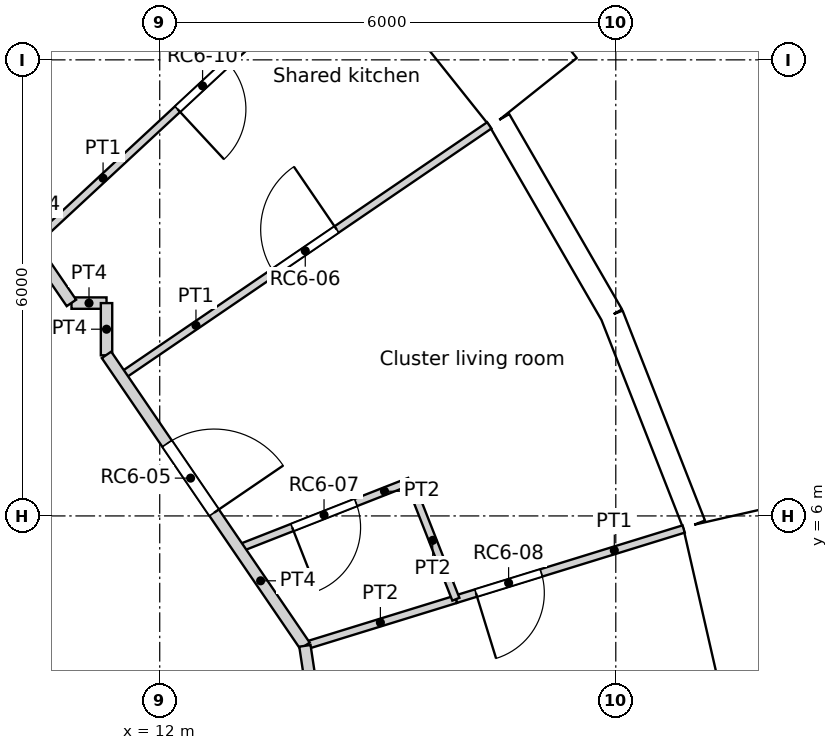
"""IFC4 building model, lengths in metres.
Left out: names, types, materials, properties, quantities, classifications, styles, units other than length and angle.
Written with IfcOpenShell. Run it as: python <this file> out.ifc"""

import sys

from ifc_helpers import new_model, si_unit, direction, frame, frame_2d, origin, origin_2d, place, context, subcontext, project, spatial, rectangle, circle, extrude, element, fill, save


model = new_model("IFC4")
c1 = context("Model", 3, precision=1e-05, world=origin(), true_north=direction((0.0, 1.0)))
c2 = subcontext(c1, "Body", "Model", "MODEL_VIEW")
j1 = project(units=[si_unit("LENGTHUNIT", "METRE"), si_unit("PLANEANGLEUNIT", "RADIAN")], contexts=[c1])
p1 = place(None, origin())
s1 = spatial("IfcSite", under=j1, at=p1, CompositionType="ELEMENT")
p2 = place(p1, origin())
s2 = spatial("IfcBuilding", under=s1, at=p2, CompositionType="ELEMENT")
p3 = place(p2, frame((0.0, 0.0, 283.8)))
s3 = spatial("IfcBuildingStorey", under=s2, at=p3, CompositionType="ELEMENT", Elevation=283.8)
for number, where, z_axis, x_axis in (
    (1, (17.986, 5.548, 0.0), (0.0, 0.0, 1.0), (1.0, 0.0, 0.0)),
    (2, (15.552, 10.603, 0.0), (0.0, 0.0, 1.0), (1.0, 0.0, 0.0)),
):
    element("IfcColumn", number, at=place(p3, frame(where, z_axis=z_axis, x_axis=x_axis)), inside=s3, PredefinedType="COLUMN", context=c2, shape_type="SweptSolid", body=[
        extrude(circle(Radius=0.45, at=origin_2d()), origin(), (0.0, 0.0, 1.0), 3.6),
    ])
p4 = place(p3, frame((20.262, 3.086, -0.35), z_axis=(0.0, 0.0, 1.0), x_axis=(-0.222570682856, 0.974916555985, 0.0)))
e3 = element("IfcWall", 3, at=p4, inside=s3, PredefinedType="ELEMENTEDWALL", context=c2, shape_type="SweptSolid", body=[
    extrude(rectangle(XDim=3.0, YDim=1.45, at=frame_2d((1.5, 0.0))), origin(), (0.0, 0.0, 1.0), 3.6),
])
p5 = place(p4, frame((1.5, 0.0, 1.9)))
e4 = element("IfcOpeningElement", 4, at=p5, cuts=e3, PredefinedType="OPENING", context=c2, shape_type="SweptSolid", body=[
    extrude(circle(Radius=0.9, at=origin_2d()), frame((0.0, 0.735, 0.0), z_axis=(0.0, -1.0, 0.0), x_axis=(1.0, 0.0, 0.0)), (0.0, 0.0, 1.0), 1.47),
])
p6 = place(p3, frame((19.031, 5.886, 0.0), z_axis=(0.0, 0.0, 1.0), x_axis=(-0.365343821297, 0.930872650925, 0.0)))
e5 = element("IfcWall", 5, at=p6, inside=s3, PredefinedType="SOLIDWALL", context=c2, shape_type="SweptSolid", body=[
    extrude(rectangle(XDim=2.962, YDim=0.3, at=frame_2d((1.481, 0.0))), origin(), (0.0, 0.0, 1.0), 3.25),
])
p7 = place(p6, frame((1.481, 0.0, 1.55)))
e6 = element("IfcOpeningElement", 6, at=p7, cuts=e5, PredefinedType="OPENING", context=c2, shape_type="SweptSolid", body=[
    extrude(circle(Radius=0.9, at=origin_2d()), frame((0.0, 0.16, 0.0), z_axis=(0.0, -1.0, 0.0), x_axis=(1.0, 0.0, 0.0)), (0.0, 0.0, 1.0), 0.32),
])
p8 = place(p3, frame((17.949, 8.644, 0.0), z_axis=(0.0, 0.0, 1.0), x_axis=(-0.500012570604, 0.866018146021, 0.0)))
e7 = element("IfcWall", 7, at=p8, inside=s3, PredefinedType="SOLIDWALL", context=c2, shape_type="SweptSolid", body=[
    extrude(rectangle(XDim=2.962, YDim=0.3, at=frame_2d((1.481, 0.0))), origin(), (0.0, 0.0, 1.0), 3.25),
])
p9 = place(p8, frame((1.481, 0.0, 1.55)))
e8 = element("IfcOpeningElement", 8, at=p9, cuts=e7, PredefinedType="OPENING", context=c2, shape_type="SweptSolid", body=[
    extrude(circle(Radius=0.9, at=origin_2d()), frame((0.0, 0.16, 0.0), z_axis=(0.0, -1.0, 0.0), x_axis=(1.0, 0.0, 0.0)), (0.0, 0.0, 1.0), 0.32),
])
p10 = place(p3, frame((16.917, 11.572, -0.35), z_axis=(0.0, 0.0, 1.0), x_axis=(-0.623523286312, 0.781804778335, 0.0)))
e9 = element("IfcWall", 9, at=p10, inside=s3, PredefinedType="ELEMENTEDWALL", context=c2, shape_type="SweptSolid", body=[
    extrude(rectangle(XDim=3.0, YDim=1.45, at=frame_2d((1.5, 0.0))), origin(), (0.0, 0.0, 1.0), 3.6),
])
p11 = place(p10, frame((1.5, 0.0, 1.9)))
e10 = element("IfcOpeningElement", 10, at=p11, cuts=e9, PredefinedType="OPENING", context=c2, shape_type="SweptSolid", body=[
    extrude(circle(Radius=0.9, at=origin_2d()), frame((0.0, 0.735, 0.0), z_axis=(0.0, -1.0, 0.0), x_axis=(1.0, 0.0, 0.0)), (0.0, 0.0, 1.0), 1.47),
])
p12 = place(p3, frame((9.075, 11.381, 0.0), z_axis=(0.0, 0.0, 1.0), x_axis=(0.564277533473, -0.825585165333, 0.0)))
e11 = element("IfcWall", 11, at=p12, inside=s3, PredefinedType="PARTITIONING", context=c2, shape_type="SweptSolid", body=[
    extrude(rectangle(XDim=3.123, YDim=0.15, at=frame_2d((1.562, 0.0))), origin(), (0.0, 0.0, 1.0), 3.25),
])
p13 = place(p3, frame((10.839, 8.8, 0.0), z_axis=(0.0, 0.0, 1.0), x_axis=(1.0, 0.0, 0.0)))
e12 = element("IfcWall", 12, at=p13, inside=s3, PredefinedType="PARTITIONING", context=c2, shape_type="SweptSolid", body=[
    extrude(rectangle(XDim=0.461, YDim=0.15, at=frame_2d((0.23, 0.0))), origin(), (0.0, 0.0, 1.0), 3.25),
])
p14 = place(p3, frame((11.3, 8.113, 0.0), z_axis=(0.0, 0.0, 1.0), x_axis=(0.0, 1.0, 0.0)))
e13 = element("IfcWall", 13, at=p14, inside=s3, PredefinedType="PARTITIONING", context=c2, shape_type="SweptSolid", body=[
    extrude(rectangle(XDim=0.687, YDim=0.15, at=frame_2d((0.344, 0.0))), origin(), (0.0, 0.0, 1.0), 3.25),
])
p15 = place(p3, frame((11.3, 8.119, 0.0), z_axis=(0.0, 0.0, 1.0), x_axis=(0.56348561488, -0.82612587529, 0.0)))
e14 = element("IfcWall", 14, at=p15, inside=s3, PredefinedType="PARTITIONING", context=c2, shape_type="SweptSolid", body=[
    extrude(rectangle(XDim=4.633, YDim=0.15, at=frame_2d((2.316, 0.0))), origin(), (0.0, 0.0, 1.0), 3.25),
])
p16 = place(p15, frame((1.413, 0.0, 0.0)))
e15 = element("IfcOpeningElement", 15, at=p16, cuts=e14, PredefinedType="OPENING", context=c2, shape_type="SweptSolid", body=[
    extrude(rectangle(XDim=1.1, YDim=2.1, at=frame_2d((0.55, 1.05))), frame((0.0, 0.075, 0.0), z_axis=(0.0, -1.0, 0.0), x_axis=(1.0, 0.0, 0.0)), (0.0, 0.0, 1.0), 0.15),
])
p17 = place(p3, frame((13.91, 4.291, 0.0), z_axis=(0.0, 0.0, 1.0), x_axis=(0.149143716951, -0.988815529659, 0.0)))
e16 = element("IfcWall", 16, at=p17, inside=s3, PredefinedType="PARTITIONING", context=c2, shape_type="SweptSolid", body=[
    extrude(rectangle(XDim=4.34, YDim=0.15, at=frame_2d((2.17, 0.0))), origin(), (0.0, 0.0, 1.0), 3.25),
])
p18 = place(p3, frame((11.493, 7.836, 0.0), z_axis=(0.0, 0.0, 1.0), x_axis=(0.826231748746, 0.563330362544, 0.0)))
e17 = element("IfcWall", 17, at=p18, inside=s3, PredefinedType="PARTITIONING", context=c2, shape_type="SweptSolid", body=[
    extrude(rectangle(XDim=5.862, YDim=0.1, at=frame_2d((2.931, 0.0))), origin(), (0.0, 0.0, 1.0), 3.25),
])
p19 = place(p18, frame((2.431, 0.0, 0.0)))
e18 = element("IfcOpeningElement", 18, at=p19, cuts=e17, PredefinedType="OPENING", context=c2, shape_type="SweptSolid", body=[
    extrude(rectangle(XDim=1.0, YDim=2.04, at=frame_2d((0.5, 1.02))), frame((0.0, 0.05, 0.0), z_axis=(0.0, -1.0, 0.0), x_axis=(1.0, 0.0, 0.0)), (0.0, 0.0, 1.0), 0.1),
])
p20 = place(p3, frame((15.287, 6.454, 0.0), z_axis=(0.0, 0.0, 1.0), x_axis=(0.365620622357, -0.930763966056, 0.0)))
e19 = element("IfcWall", 19, at=p20, inside=s3, PredefinedType="PARTITIONING", context=c2, shape_type="SweptSolid", body=[
    extrude(rectangle(XDim=1.665, YDim=0.1, at=frame_2d((0.833, 0.0))), origin(), (0.0, 0.0, 1.0), 3.25),
])
p21 = place(p3, frame((13.037, 5.571, 0.0), z_axis=(0.0, 0.0, 1.0), x_axis=(0.930874211086, 0.365339846083, 0.0)))
e20 = element("IfcWall", 20, at=p21, inside=s3, PredefinedType="PARTITIONING", context=c2, shape_type="SweptSolid", body=[
    extrude(rectangle(XDim=2.417, YDim=0.1, at=frame_2d((1.208, 0.0))), origin(), (0.0, 0.0, 1.0), 3.25),
])
p22 = place(p21, frame((0.758, 0.0, 0.0)))
e21 = element("IfcOpeningElement", 21, at=p22, cuts=e20, PredefinedType="OPENING", context=c2, shape_type="SweptSolid", body=[
    extrude(rectangle(XDim=0.9, YDim=2.0, at=frame_2d((0.45, 1.0))), frame((0.0, 0.05, 0.0), z_axis=(0.0, -1.0, 0.0), x_axis=(1.0, 0.0, 0.0)), (0.0, 0.0, 1.0), 0.1),
])
p23 = place(p3, frame((15.896, 4.904, 0.0), z_axis=(0.0, 0.0, 1.0), x_axis=(0.955630770746, 0.294567190983, 0.0)))
e22 = element("IfcWall", 22, at=p23, inside=s3, PredefinedType="PARTITIONING", context=c2, shape_type="SweptSolid", body=[
    extrude(rectangle(XDim=3.136, YDim=0.1, at=frame_2d((1.568, 0.0))), origin(), (0.0, 0.0, 1.0), 3.25),
])
p24 = place(p23, frame((0.276, 0.0, 0.0)))
e23 = element("IfcOpeningElement", 23, at=p24, cuts=e22, PredefinedType="OPENING", context=c2, shape_type="SweptSolid", body=[
    extrude(rectangle(XDim=0.9, YDim=2.1, at=frame_2d((0.45, 1.05))), frame((0.0, 0.05, 0.0), z_axis=(0.0, -1.0, 0.0), x_axis=(1.0, 0.0, 0.0)), (0.0, 0.0, 1.0), 0.1),
])
p25 = place(p3, frame((10.312, 9.568, 0.0), z_axis=(0.0, 0.0, 1.0), x_axis=(0.733002312561, 0.680226146057, 0.0)))
e24 = element("IfcWall", 24, at=p25, inside=s3, PredefinedType="PARTITIONING", context=c2, shape_type="SweptSolid", body=[
    extrude(rectangle(XDim=5.704, YDim=0.1, at=frame_2d((2.852, 0.0))), origin(), (0.0, 0.0, 1.0), 3.25),
])
p26 = place(p25, frame((2.622, 0.0, 0.0)))
e25 = element("IfcOpeningElement", 25, at=p26, cuts=e24, PredefinedType="OPENING", context=c2, shape_type="SweptSolid", body=[
    extrude(rectangle(XDim=0.9, YDim=2.1, at=frame_2d((0.45, 1.05))), frame((0.0, 0.05, 0.0), z_axis=(0.0, -1.0, 0.0), x_axis=(1.0, 0.0, 0.0)), (0.0, 0.0, 1.0), 0.1),
])
p27 = place(p3, frame((13.91, 4.291, 0.0), z_axis=(0.0, 0.0, 1.0), x_axis=(0.955649377322, 0.294506821014, 0.0)))
e26 = element("IfcWall", 26, at=p27, inside=s3, PredefinedType="PARTITIONING", context=c2, shape_type="SweptSolid", body=[
    extrude(rectangle(XDim=2.078, YDim=0.1, at=frame_2d((1.039, 0.0))), origin(), (0.0, 0.0, 1.0), 3.25),
])
p28 = place(p5, origin())
e27 = element("IfcWindow", 27, at=p28, inside=s3, PartitioningType="SINGLE_PANEL", PredefinedType="WINDOW", context=c2, shape_type="SweptSolid", body=[
    extrude(circle(Radius=0.9, at=origin_2d()), frame((0.0, 0.695, 0.0), z_axis=(0.0, -1.0, 0.0), x_axis=(1.0, 0.0, 0.0)), (0.0, 0.0, 1.0), 0.1),
])
fill(e4, e27)
p29 = place(p7, origin())
e28 = element("IfcWindow", 28, at=p29, inside=s3, PartitioningType="SINGLE_PANEL", PredefinedType="WINDOW", context=c2, shape_type="SweptSolid", body=[
    extrude(circle(Radius=0.9, at=origin_2d()), frame((0.0, 0.12, 0.0), z_axis=(0.0, -1.0, 0.0), x_axis=(1.0, 0.0, 0.0)), (0.0, 0.0, 1.0), 0.1),
])
fill(e6, e28)
p30 = place(p9, origin())
e29 = element("IfcWindow", 29, at=p30, inside=s3, PartitioningType="SINGLE_PANEL", PredefinedType="WINDOW", context=c2, shape_type="SweptSolid", body=[
    extrude(circle(Radius=0.9, at=origin_2d()), frame((0.0, 0.12, 0.0), z_axis=(0.0, -1.0, 0.0), x_axis=(1.0, 0.0, 0.0)), (0.0, 0.0, 1.0), 0.1),
])
fill(e8, e29)
p31 = place(p11, origin())
e30 = element("IfcWindow", 30, at=p31, inside=s3, PartitioningType="SINGLE_PANEL", PredefinedType="WINDOW", context=c2, shape_type="SweptSolid", body=[
    extrude(circle(Radius=0.9, at=origin_2d()), frame((0.0, 0.695, 0.0), z_axis=(0.0, -1.0, 0.0), x_axis=(1.0, 0.0, 0.0)), (0.0, 0.0, 1.0), 0.1),
])
fill(e10, e30)
p32 = place(p16, origin())
e31 = element("IfcDoor", 31, at=p32, inside=s3, OperationType="SINGLE_SWING_RIGHT", PredefinedType="DOOR", context=c2, shape_type="SweptSolid", body=[
    extrude(rectangle(XDim=1.1, YDim=2.1, at=frame_2d((0.55, 1.05))), frame((0.0, 0.025, 0.0), z_axis=(0.0, -1.0, 0.0), x_axis=(1.0, 0.0, 0.0)), (0.0, 0.0, 1.0), 0.05),
])
fill(e15, e31)
p33 = place(p19, origin())
e32 = element("IfcDoor", 32, at=p33, inside=s3, OperationType="SINGLE_SWING_RIGHT", PredefinedType="DOOR", context=c2, shape_type="SweptSolid", body=[
    extrude(rectangle(XDim=1.0, YDim=2.04, at=frame_2d((0.5, 1.02))), frame((0.0, 0.025, 0.0), z_axis=(0.0, -1.0, 0.0), x_axis=(1.0, 0.0, 0.0)), (0.0, 0.0, 1.0), 0.05),
])
fill(e18, e32)
p34 = place(p22, origin())
e33 = element("IfcDoor", 33, at=p34, inside=s3, OperationType="SINGLE_SWING_RIGHT", PredefinedType="DOOR", context=c2, shape_type="SweptSolid", body=[
    extrude(rectangle(XDim=0.9, YDim=2.0, at=frame_2d((0.45, 1.0))), frame((0.0, 0.025, 0.0), z_axis=(0.0, -1.0, 0.0), x_axis=(1.0, 0.0, 0.0)), (0.0, 0.0, 1.0), 0.05),
])
fill(e21, e33)
p35 = place(p24, origin())
e34 = element("IfcDoor", 34, at=p35, inside=s3, OperationType="SINGLE_SWING_RIGHT", PredefinedType="DOOR", context=c2, shape_type="SweptSolid", body=[
    extrude(rectangle(XDim=0.9, YDim=2.1, at=frame_2d((0.45, 1.05))), frame((0.0, 0.025, 0.0), z_axis=(0.0, -1.0, 0.0), x_axis=(1.0, 0.0, 0.0)), (0.0, 0.0, 1.0), 0.05),
])
fill(e23, e34)
p36 = place(p26, origin())
e35 = element("IfcDoor", 35, at=p36, inside=s3, OperationType="SINGLE_SWING_RIGHT", PredefinedType="DOOR", context=c2, shape_type="SweptSolid", body=[
    extrude(rectangle(XDim=0.9, YDim=2.1, at=frame_2d((0.45, 1.05))), frame((0.0, 0.025, 0.0), z_axis=(0.0, -1.0, 0.0), x_axis=(1.0, 0.0, 0.0)), (0.0, 0.0, 1.0), 0.05),
])
fill(e25, e35)
save(model, sys.argv[1])
